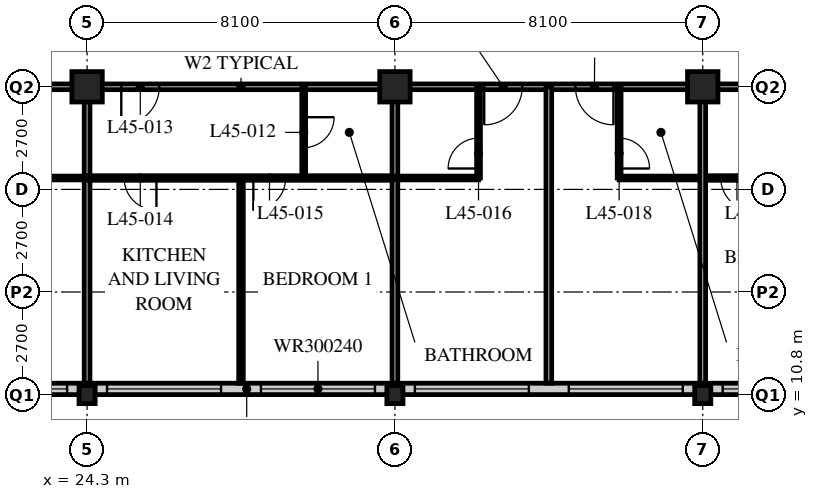
"""IFC4 building model, lengths in metres.
Left out: names, types, materials, properties, quantities, classifications, styles, units other than length and angle.
Written with IfcOpenShell. Run it as: python <this file> out.ifc"""

import sys

from ifc_helpers import new_model, si_unit, direction, frame, frame_2d, origin, origin_2d, place, context, subcontext, project, spatial, rectangle, hollow_rectangle, i_section, extrude, element, fill, save


model = new_model("IFC4")
c1 = context("Model", 3, precision=1e-05, world=origin(), true_north=direction((0.0, 1.0)))
c2 = subcontext(c1, "Body", "Model", "MODEL_VIEW")
j1 = project(units=[si_unit("LENGTHUNIT", "METRE"), si_unit("PLANEANGLEUNIT", "RADIAN")], contexts=[c1])
p1 = place(None, origin())
s1 = spatial("IfcSite", under=j1, at=p1, CompositionType="ELEMENT")
p2 = place(p1, origin())
s2 = spatial("IfcBuilding", under=s1, at=p2, CompositionType="ELEMENT")
p3 = place(p2, frame((0.0, 0.0, 177.6)))
s3 = spatial("IfcBuildingStorey", under=s2, at=p3, CompositionType="ELEMENT", Elevation=177.6)
p4 = place(p3, frame((24.3, 10.8, 0.0), z_axis=(0.0, 0.0, 1.0), x_axis=(1.0, 0.0, 0.0)))
e1 = element("IfcColumn", 1, at=p4, inside=s3, PredefinedType="COLUMN", context=c2, shape_type="SweptSolid", body=[
    extrude(i_section(OverallWidth=0.424, OverallDepth=0.475, WebThickness=0.048, FlangeThickness=0.077, FilletRadius=0.015, at=origin_2d()), origin(), (0.0, 0.0, 1.0), 3.6),
])
p5 = place(p3, frame((24.3, 18.9, 0.0), z_axis=(0.0, 0.0, 1.0), x_axis=(1.0, 0.0, 0.0)))
e2 = element("IfcColumn", 2, at=p5, inside=s3, PredefinedType="COLUMN", context=c2, shape_type="SweptSolid", body=[
    extrude(hollow_rectangle(XDim=0.8, YDim=0.8, WallThickness=0.08, at=origin_2d()), origin(), (0.0, 0.0, 1.0), 3.6),
])
p6 = place(p3, frame((32.4, 10.8, 0.0), z_axis=(0.0, 0.0, 1.0), x_axis=(1.0, 0.0, 0.0)))
e3 = element("IfcColumn", 3, at=p6, inside=s3, PredefinedType="COLUMN", context=c2, shape_type="SweptSolid", body=[
    extrude(i_section(OverallWidth=0.424, OverallDepth=0.475, WebThickness=0.048, FlangeThickness=0.077, FilletRadius=0.015, at=origin_2d()), origin(), (0.0, 0.0, 1.0), 3.6),
])
p7 = place(p3, frame((32.4, 18.9, 0.0), z_axis=(0.0, 0.0, 1.0), x_axis=(1.0, 0.0, 0.0)))
e4 = element("IfcColumn", 4, at=p7, inside=s3, PredefinedType="COLUMN", context=c2, shape_type="SweptSolid", body=[
    extrude(hollow_rectangle(XDim=0.8, YDim=0.8, WallThickness=0.08, at=origin_2d()), origin(), (0.0, 0.0, 1.0), 3.6),
])
p8 = place(p3, frame((40.5, 10.8, 0.0), z_axis=(0.0, 0.0, 1.0), x_axis=(1.0, 0.0, 0.0)))
e5 = element("IfcColumn", 5, at=p8, inside=s3, PredefinedType="COLUMN", context=c2, shape_type="SweptSolid", body=[
    extrude(i_section(OverallWidth=0.424, OverallDepth=0.475, WebThickness=0.048, FlangeThickness=0.077, FilletRadius=0.015, at=origin_2d()), origin(), (0.0, 0.0, 1.0), 3.6),
])
p9 = place(p3, frame((40.5, 18.9, 0.0), z_axis=(0.0, 0.0, 1.0), x_axis=(1.0, 0.0, 0.0)))
e6 = element("IfcColumn", 6, at=p9, inside=s3, PredefinedType="COLUMN", context=c2, shape_type="SweptSolid", body=[
    extrude(hollow_rectangle(XDim=0.8, YDim=0.8, WallThickness=0.08, at=origin_2d()), origin(), (0.0, 0.0, 1.0), 3.6),
])
p10 = place(p3, frame((8.4, 10.95, 0.0), z_axis=(0.0, 0.0, 1.0), x_axis=(1.0, 0.0, 0.0)))
e7 = element("IfcWall", 7, at=p10, inside=s3, PredefinedType="SOLIDWALL", context=c2, shape_type="SweptSolid", body=[
    extrude(rectangle(XDim=40.2, YDim=0.3, at=frame_2d((20.1, 0.0))), origin(), (0.0, 0.0, 1.0), 3.39),
])
p11 = place(p10, frame((0.225, 0.0, 0.6)))
e8 = element("IfcOpeningElement", 8, at=p11, cuts=e7, PredefinedType="OPENING", context=c2, shape_type="SweptSolid", body=[
    extrude(rectangle(XDim=3.0, YDim=2.4, at=frame_2d((1.5, 1.2))), frame((0.0, 0.16, 0.0), z_axis=(0.0, -1.0, 0.0), x_axis=(1.0, 0.0, 0.0)), (0.0, 0.0, 1.0), 0.32),
])
p12 = place(p10, frame((4.275, 0.0, 0.6)))
e9 = element("IfcOpeningElement", 9, at=p12, cuts=e7, PredefinedType="OPENING", context=c2, shape_type="SweptSolid", body=[
    extrude(rectangle(XDim=3.0, YDim=2.4, at=frame_2d((1.5, 1.2))), frame((0.0, 0.16, 0.0), z_axis=(0.0, -1.0, 0.0), x_axis=(1.0, 0.0, 0.0)), (0.0, 0.0, 1.0), 0.32),
])
p13 = place(p10, frame((8.325, 0.0, 0.6)))
e10 = element("IfcOpeningElement", 10, at=p13, cuts=e7, PredefinedType="OPENING", context=c2, shape_type="SweptSolid", body=[
    extrude(rectangle(XDim=3.0, YDim=2.4, at=frame_2d((1.5, 1.2))), frame((0.0, 0.16, 0.0), z_axis=(0.0, -1.0, 0.0), x_axis=(1.0, 0.0, 0.0)), (0.0, 0.0, 1.0), 0.32),
])
p14 = place(p10, frame((12.375, 0.0, 0.6)))
e11 = element("IfcOpeningElement", 11, at=p14, cuts=e7, PredefinedType="OPENING", context=c2, shape_type="SweptSolid", body=[
    extrude(rectangle(XDim=3.0, YDim=2.4, at=frame_2d((1.5, 1.2))), frame((0.0, 0.16, 0.0), z_axis=(0.0, -1.0, 0.0), x_axis=(1.0, 0.0, 0.0)), (0.0, 0.0, 1.0), 0.32),
])
p15 = place(p10, frame((16.425, 0.0, 0.6)))
e12 = element("IfcOpeningElement", 12, at=p15, cuts=e7, PredefinedType="OPENING", context=c2, shape_type="SweptSolid", body=[
    extrude(rectangle(XDim=3.0, YDim=2.4, at=frame_2d((1.5, 1.2))), frame((0.0, 0.16, 0.0), z_axis=(0.0, -1.0, 0.0), x_axis=(1.0, 0.0, 0.0)), (0.0, 0.0, 1.0), 0.32),
])
p16 = place(p10, frame((20.475, 0.0, 0.6)))
e13 = element("IfcOpeningElement", 13, at=p16, cuts=e7, PredefinedType="OPENING", context=c2, shape_type="SweptSolid", body=[
    extrude(rectangle(XDim=3.0, YDim=2.4, at=frame_2d((1.5, 1.2))), frame((0.0, 0.16, 0.0), z_axis=(0.0, -1.0, 0.0), x_axis=(1.0, 0.0, 0.0)), (0.0, 0.0, 1.0), 0.32),
])
p17 = place(p10, frame((24.525, 0.0, 0.6)))
e14 = element("IfcOpeningElement", 14, at=p17, cuts=e7, PredefinedType="OPENING", context=c2, shape_type="SweptSolid", body=[
    extrude(rectangle(XDim=3.0, YDim=2.4, at=frame_2d((1.5, 1.2))), frame((0.0, 0.16, 0.0), z_axis=(0.0, -1.0, 0.0), x_axis=(1.0, 0.0, 0.0)), (0.0, 0.0, 1.0), 0.32),
])
p18 = place(p10, frame((28.575, 0.0, 0.6)))
e15 = element("IfcOpeningElement", 15, at=p18, cuts=e7, PredefinedType="OPENING", context=c2, shape_type="SweptSolid", body=[
    extrude(rectangle(XDim=3.0, YDim=2.4, at=frame_2d((1.5, 1.2))), frame((0.0, 0.16, 0.0), z_axis=(0.0, -1.0, 0.0), x_axis=(1.0, 0.0, 0.0)), (0.0, 0.0, 1.0), 0.32),
])
p19 = place(p10, frame((32.625, 0.0, 0.6)))
e16 = element("IfcOpeningElement", 16, at=p19, cuts=e7, PredefinedType="OPENING", context=c2, shape_type="SweptSolid", body=[
    extrude(rectangle(XDim=3.0, YDim=2.4, at=frame_2d((1.5, 1.2))), frame((0.0, 0.16, 0.0), z_axis=(0.0, -1.0, 0.0), x_axis=(1.0, 0.0, 0.0)), (0.0, 0.0, 1.0), 0.32),
])
p20 = place(p10, frame((36.675, 0.0, 0.6)))
e17 = element("IfcOpeningElement", 17, at=p20, cuts=e7, PredefinedType="OPENING", context=c2, shape_type="SweptSolid", body=[
    extrude(rectangle(XDim=3.0, YDim=2.4, at=frame_2d((1.5, 1.2))), frame((0.0, 0.16, 0.0), z_axis=(0.0, -1.0, 0.0), x_axis=(1.0, 0.0, 0.0)), (0.0, 0.0, 1.0), 0.32),
])
p21 = place(p3, frame((12.15, 18.9, 0.0), z_axis=(0.0, 0.0, 1.0), x_axis=(1.0, 0.0, 0.0)))
e18 = element("IfcWall", 18, at=p21, inside=s3, PredefinedType="PARTITIONING", context=c2, shape_type="SweptSolid", body=[
    extrude(rectangle(XDim=32.4, YDim=0.15, at=frame_2d((16.2, 0.0))), origin(), (0.0, 0.0, 1.0), 2.778),
])
p22 = place(p21, frame((6.4, 0.0, 0.0)))
e19 = element("IfcOpeningElement", 19, at=p22, cuts=e18, PredefinedType="OPENING", context=c2, shape_type="SweptSolid", body=[
    extrude(rectangle(XDim=1.0, YDim=2.1, at=frame_2d((0.5, 1.05))), frame((0.0, 0.085, 0.0), z_axis=(0.0, -1.0, 0.0), x_axis=(1.0, 0.0, 0.0)), (0.0, 0.0, 1.0), 0.17),
])
p23 = place(p21, frame((8.8, 0.0, 0.0)))
e20 = element("IfcOpeningElement", 20, at=p23, cuts=e18, PredefinedType="OPENING", context=c2, shape_type="SweptSolid", body=[
    extrude(rectangle(XDim=1.0, YDim=2.1, at=frame_2d((0.5, 1.05))), frame((0.0, 0.085, 0.0), z_axis=(0.0, -1.0, 0.0), x_axis=(1.0, 0.0, 0.0)), (0.0, 0.0, 1.0), 0.17),
])
p24 = place(p21, frame((13.05, 0.0, 0.0)))
e21 = element("IfcOpeningElement", 21, at=p24, cuts=e18, PredefinedType="OPENING", context=c2, shape_type="SweptSolid", body=[
    extrude(rectangle(XDim=1.0, YDim=2.1, at=frame_2d((0.5, 1.05))), frame((0.0, 0.085, 0.0), z_axis=(0.0, -1.0, 0.0), x_axis=(1.0, 0.0, 0.0)), (0.0, 0.0, 1.0), 0.17),
])
p25 = place(p21, frame((22.6, 0.0, 0.0)))
e22 = element("IfcOpeningElement", 22, at=p25, cuts=e18, PredefinedType="OPENING", context=c2, shape_type="SweptSolid", body=[
    extrude(rectangle(XDim=1.0, YDim=2.1, at=frame_2d((0.5, 1.05))), frame((0.0, 0.085, 0.0), z_axis=(0.0, -1.0, 0.0), x_axis=(1.0, 0.0, 0.0)), (0.0, 0.0, 1.0), 0.17),
])
p26 = place(p21, frame((25.0, 0.0, 0.0)))
e23 = element("IfcOpeningElement", 23, at=p26, cuts=e18, PredefinedType="OPENING", context=c2, shape_type="SweptSolid", body=[
    extrude(rectangle(XDim=1.0, YDim=2.1, at=frame_2d((0.5, 1.05))), frame((0.0, 0.085, 0.0), z_axis=(0.0, -1.0, 0.0), x_axis=(1.0, 0.0, 0.0)), (0.0, 0.0, 1.0), 0.17),
])
p27 = place(p21, frame((1.525, 0.0, 0.0)))
e24 = element("IfcOpeningElement", 24, at=p27, cuts=e18, PredefinedType="OPENING", context=c2, shape_type="SweptSolid", body=[
    extrude(rectangle(XDim=1.0, YDim=2.1, at=frame_2d((0.5, 1.05))), frame((0.0, 0.085, 0.0), z_axis=(0.0, -1.0, 0.0), x_axis=(1.0, 0.0, 0.0)), (0.0, 0.0, 1.0), 0.17),
])
p28 = place(p21, frame((29.875, 0.0, 0.0)))
e25 = element("IfcOpeningElement", 25, at=p28, cuts=e18, PredefinedType="OPENING", context=c2, shape_type="SweptSolid", body=[
    extrude(rectangle(XDim=1.0, YDim=2.1, at=frame_2d((0.5, 1.05))), frame((0.0, 0.085, 0.0), z_axis=(0.0, -1.0, 0.0), x_axis=(1.0, 0.0, 0.0)), (0.0, 0.0, 1.0), 0.17),
])
p29 = place(p3, frame((22.1, 16.5, 0.0), z_axis=(0.0, 0.0, 1.0), x_axis=(1.0, 0.0, 0.0)))
e26 = element("IfcWall", 26, at=p29, inside=s3, PredefinedType="PARTITIONING", context=c2, shape_type="SweptSolid", body=[
    extrude(rectangle(XDim=2.2, YDim=0.1, at=frame_2d((1.1, 0.0))), origin(), (0.0, 0.0, 1.0), 3.39),
])
p30 = place(p3, frame((24.3, 18.9, 0.0), z_axis=(0.0, 0.0, 1.0), x_axis=(0.0, -1.0, 0.0)))
e27 = element("IfcWall", 27, at=p30, inside=s3, PredefinedType="PARTITIONING", context=c2, shape_type="SweptSolid", body=[
    extrude(rectangle(XDim=7.8, YDim=0.15, at=frame_2d((3.9, 0.0))), origin(), (0.0, 0.0, 1.0), 2.778),
])
p31 = place(p3, frame((24.3, 16.5, 0.0), z_axis=(0.0, 0.0, 1.0), x_axis=(1.0, 0.0, 0.0)))
e28 = element("IfcWall", 28, at=p31, inside=s3, PredefinedType="PARTITIONING", context=c2, shape_type="SweptSolid", body=[
    extrude(rectangle(XDim=8.1, YDim=0.12, at=frame_2d((4.05, 0.0))), origin(), (0.0, 0.0, 1.0), 3.39),
])
p32 = place(p31, frame((0.975, 0.0, 0.0)))
e29 = element("IfcOpeningElement", 29, at=p32, cuts=e28, PredefinedType="OPENING", context=c2, shape_type="SweptSolid", body=[
    extrude(rectangle(XDim=0.85, YDim=2.1, at=frame_2d((0.425, 1.05))), frame((0.0, 0.07, 0.0), z_axis=(0.0, -1.0, 0.0), x_axis=(1.0, 0.0, 0.0)), (0.0, 0.0, 1.0), 0.14),
])
p33 = place(p31, frame((4.375, 0.0, 0.0)))
e30 = element("IfcOpeningElement", 30, at=p33, cuts=e28, PredefinedType="OPENING", context=c2, shape_type="SweptSolid", body=[
    extrude(rectangle(XDim=0.85, YDim=2.1, at=frame_2d((0.425, 1.05))), frame((0.0, 0.07, 0.0), z_axis=(0.0, -1.0, 0.0), x_axis=(1.0, 0.0, 0.0)), (0.0, 0.0, 1.0), 0.14),
])
p34 = place(p3, frame((30.0, 18.9, 0.0), z_axis=(0.0, 0.0, 1.0), x_axis=(0.0, -1.0, 0.0)))
e31 = element("IfcWall", 31, at=p34, inside=s3, PredefinedType="PARTITIONING", context=c2, shape_type="SweptSolid", body=[
    extrude(rectangle(XDim=2.4, YDim=0.1, at=frame_2d((1.2, 0.0))), origin(), (0.0, 0.0, 1.0), 3.39),
])
p35 = place(p34, frame((0.8, 0.0, 0.0)))
e32 = element("IfcOpeningElement", 32, at=p35, cuts=e31, PredefinedType="OPENING", context=c2, shape_type="SweptSolid", body=[
    extrude(rectangle(XDim=0.8, YDim=2.1, at=frame_2d((0.4, 1.05))), frame((0.0, 0.06, 0.0), z_axis=(0.0, -1.0, 0.0), x_axis=(1.0, 0.0, 0.0)), (0.0, 0.0, 1.0), 0.12),
])
p36 = place(p3, frame((28.35, 16.5, 0.0), z_axis=(0.0, 0.0, 1.0), x_axis=(0.0, -1.0, 0.0)))
e33 = element("IfcWall", 33, at=p36, inside=s3, PredefinedType="PARTITIONING", context=c2, shape_type="SweptSolid", body=[
    extrude(rectangle(XDim=5.4, YDim=0.12, at=frame_2d((2.7, 0.0))), origin(), (0.0, 0.0, 1.0), 3.39),
])
p37 = place(p3, frame((32.4, 18.9, 0.0), z_axis=(0.0, 0.0, 1.0), x_axis=(0.0, -1.0, 0.0)))
e34 = element("IfcWall", 34, at=p37, inside=s3, PredefinedType="PARTITIONING", context=c2, shape_type="SweptSolid", body=[
    extrude(rectangle(XDim=7.8, YDim=0.15, at=frame_2d((3.9, 0.0))), origin(), (0.0, 0.0, 1.0), 2.778),
])
p38 = place(p3, frame((32.4, 16.5, 0.0), z_axis=(0.0, 0.0, 1.0), x_axis=(1.0, 0.0, 0.0)))
e35 = element("IfcWall", 35, at=p38, inside=s3, PredefinedType="PARTITIONING", context=c2, shape_type="SweptSolid", body=[
    extrude(rectangle(XDim=2.2, YDim=0.1, at=frame_2d((1.1, 0.0))), origin(), (0.0, 0.0, 1.0), 3.39),
])
p39 = place(p3, frame((34.6, 18.9, 0.0), z_axis=(0.0, 0.0, 1.0), x_axis=(0.0, -1.0, 0.0)))
e36 = element("IfcWall", 36, at=p39, inside=s3, PredefinedType="PARTITIONING", context=c2, shape_type="SweptSolid", body=[
    extrude(rectangle(XDim=2.4, YDim=0.1, at=frame_2d((1.2, 0.0))), origin(), (0.0, 0.0, 1.0), 3.39),
])
p40 = place(p39, frame((1.35, 0.0, 0.0)))
e37 = element("IfcOpeningElement", 37, at=p40, cuts=e36, PredefinedType="OPENING", context=c2, shape_type="SweptSolid", body=[
    extrude(rectangle(XDim=0.8, YDim=2.1, at=frame_2d((0.4, 1.05))), frame((0.0, 0.06, 0.0), z_axis=(0.0, -1.0, 0.0), x_axis=(1.0, 0.0, 0.0)), (0.0, 0.0, 1.0), 0.12),
])
p41 = place(p3, frame((36.45, 18.9, 0.0), z_axis=(0.0, 0.0, 1.0), x_axis=(0.0, -1.0, 0.0)))
e38 = element("IfcWall", 38, at=p41, inside=s3, PredefinedType="PARTITIONING", context=c2, shape_type="SweptSolid", body=[
    extrude(rectangle(XDim=7.8, YDim=0.15, at=frame_2d((3.9, 0.0))), origin(), (0.0, 0.0, 1.0), 3.39),
])
p42 = place(p3, frame((38.3, 16.5, 0.0), z_axis=(0.0, 0.0, 1.0), x_axis=(1.0, 0.0, 0.0)))
e39 = element("IfcWall", 39, at=p42, inside=s3, PredefinedType="PARTITIONING", context=c2, shape_type="SweptSolid", body=[
    extrude(rectangle(XDim=2.2, YDim=0.1, at=frame_2d((1.1, 0.0))), origin(), (0.0, 0.0, 1.0), 3.39),
])
p43 = place(p3, frame((38.3, 18.9, 0.0), z_axis=(0.0, 0.0, 1.0), x_axis=(0.0, -1.0, 0.0)))
e40 = element("IfcWall", 40, at=p43, inside=s3, PredefinedType="PARTITIONING", context=c2, shape_type="SweptSolid", body=[
    extrude(rectangle(XDim=2.4, YDim=0.1, at=frame_2d((1.2, 0.0))), origin(), (0.0, 0.0, 1.0), 3.39),
])
p44 = place(p43, frame((1.35, 0.0, 0.0)))
e41 = element("IfcOpeningElement", 41, at=p44, cuts=e40, PredefinedType="OPENING", context=c2, shape_type="SweptSolid", body=[
    extrude(rectangle(XDim=0.8, YDim=2.1, at=frame_2d((0.4, 1.05))), frame((0.0, 0.06, 0.0), z_axis=(0.0, -1.0, 0.0), x_axis=(1.0, 0.0, 0.0)), (0.0, 0.0, 1.0), 0.12),
])
p45 = place(p3, frame((40.5, 16.5, 0.0), z_axis=(0.0, 0.0, 1.0), x_axis=(1.0, 0.0, 0.0)))
e42 = element("IfcWall", 42, at=p45, inside=s3, PredefinedType="PARTITIONING", context=c2, shape_type="SweptSolid", body=[
    extrude(rectangle(XDim=8.05, YDim=0.12, at=frame_2d((4.025, 0.0))), origin(), (0.0, 0.0, 1.0), 3.39),
])
p46 = place(p45, frame((0.475, 0.0, 0.0)))
e43 = element("IfcOpeningElement", 43, at=p46, cuts=e42, PredefinedType="OPENING", context=c2, shape_type="SweptSolid", body=[
    extrude(rectangle(XDim=0.85, YDim=2.1, at=frame_2d((0.425, 1.05))), frame((0.0, 0.07, 0.0), z_axis=(0.0, -1.0, 0.0), x_axis=(1.0, 0.0, 0.0)), (0.0, 0.0, 1.0), 0.14),
])
p47 = place(p45, frame((4.325, 0.0, 0.0)))
e44 = element("IfcOpeningElement", 44, at=p47, cuts=e42, PredefinedType="OPENING", context=c2, shape_type="SweptSolid", body=[
    extrude(rectangle(XDim=0.85, YDim=2.1, at=frame_2d((0.425, 1.05))), frame((0.0, 0.07, 0.0), z_axis=(0.0, -1.0, 0.0), x_axis=(1.0, 0.0, 0.0)), (0.0, 0.0, 1.0), 0.14),
])
p48 = place(p3, frame((40.5, 18.9, 0.0), z_axis=(0.0, 0.0, 1.0), x_axis=(0.0, -1.0, 0.0)))
e45 = element("IfcWall", 45, at=p48, inside=s3, PredefinedType="PARTITIONING", context=c2, shape_type="SweptSolid", body=[
    extrude(rectangle(XDim=7.8, YDim=0.15, at=frame_2d((3.9, 0.0))), origin(), (0.0, 0.0, 1.0), 2.778),
])
p49 = place(p14, origin())
e46 = element("IfcWindow", 46, at=p49, inside=s3, PartitioningType="SINGLE_PANEL", PredefinedType="WINDOW", context=c2, shape_type="SweptSolid", body=[
    extrude(rectangle(XDim=3.0, YDim=2.4, at=frame_2d((1.5, 1.2))), frame((0.0, 0.03, 0.0), z_axis=(0.0, -1.0, 0.0), x_axis=(1.0, 0.0, 0.0)), (0.0, 0.0, 1.0), 0.06),
])
fill(e11, e46)
p50 = place(p15, origin())
e47 = element("IfcWindow", 47, at=p50, inside=s3, PartitioningType="SINGLE_PANEL", PredefinedType="WINDOW", context=c2, shape_type="SweptSolid", body=[
    extrude(rectangle(XDim=3.0, YDim=2.4, at=frame_2d((1.5, 1.2))), frame((0.0, 0.03, 0.0), z_axis=(0.0, -1.0, 0.0), x_axis=(1.0, 0.0, 0.0)), (0.0, 0.0, 1.0), 0.06),
])
fill(e12, e47)
p51 = place(p16, origin())
e48 = element("IfcWindow", 48, at=p51, inside=s3, PartitioningType="SINGLE_PANEL", PredefinedType="WINDOW", context=c2, shape_type="SweptSolid", body=[
    extrude(rectangle(XDim=3.0, YDim=2.4, at=frame_2d((1.5, 1.2))), frame((0.0, 0.03, 0.0), z_axis=(0.0, -1.0, 0.0), x_axis=(1.0, 0.0, 0.0)), (0.0, 0.0, 1.0), 0.06),
])
fill(e13, e48)
p52 = place(p17, origin())
e49 = element("IfcWindow", 49, at=p52, inside=s3, PartitioningType="SINGLE_PANEL", PredefinedType="WINDOW", context=c2, shape_type="SweptSolid", body=[
    extrude(rectangle(XDim=3.0, YDim=2.4, at=frame_2d((1.5, 1.2))), frame((0.0, 0.03, 0.0), z_axis=(0.0, -1.0, 0.0), x_axis=(1.0, 0.0, 0.0)), (0.0, 0.0, 1.0), 0.06),
])
fill(e14, e49)
p53 = place(p18, origin())
e50 = element("IfcWindow", 50, at=p53, inside=s3, PartitioningType="SINGLE_PANEL", PredefinedType="WINDOW", context=c2, shape_type="SweptSolid", body=[
    extrude(rectangle(XDim=3.0, YDim=2.4, at=frame_2d((1.5, 1.2))), frame((0.0, 0.03, 0.0), z_axis=(0.0, -1.0, 0.0), x_axis=(1.0, 0.0, 0.0)), (0.0, 0.0, 1.0), 0.06),
])
fill(e15, e50)
p54 = place(p19, origin())
e51 = element("IfcWindow", 51, at=p54, inside=s3, PartitioningType="SINGLE_PANEL", PredefinedType="WINDOW", context=c2, shape_type="SweptSolid", body=[
    extrude(rectangle(XDim=3.0, YDim=2.4, at=frame_2d((1.5, 1.2))), frame((0.0, 0.03, 0.0), z_axis=(0.0, -1.0, 0.0), x_axis=(1.0, 0.0, 0.0)), (0.0, 0.0, 1.0), 0.06),
])
fill(e16, e51)
p55 = place(p35, origin())
e52 = element("IfcDoor", 52, at=p55, inside=s3, OperationType="SINGLE_SWING_LEFT", PredefinedType="DOOR", context=c2, shape_type="SweptSolid", body=[
    extrude(rectangle(XDim=0.8, YDim=2.1, at=frame_2d((0.4, 1.05))), frame((0.0, 0.025, 0.0), z_axis=(0.0, -1.0, 0.0), x_axis=(1.0, 0.0, 0.0)), (0.0, 0.0, 1.0), 0.05),
])
fill(e32, e52)
p56 = place(p24, origin())
e53 = element("IfcDoor", 53, at=p56, inside=s3, OperationType="SINGLE_SWING_RIGHT", PredefinedType="DOOR", context=c2, shape_type="SweptSolid", body=[
    extrude(rectangle(XDim=1.0, YDim=2.1, at=frame_2d((0.5, 1.05))), frame((0.0, 0.025, 0.0), z_axis=(0.0, -1.0, 0.0), x_axis=(1.0, 0.0, 0.0)), (0.0, 0.0, 1.0), 0.05),
])
fill(e21, e53)
p57 = place(p32, origin())
e54 = element("IfcDoor", 54, at=p57, inside=s3, OperationType="SINGLE_SWING_LEFT", PredefinedType="DOOR", context=c2, shape_type="SweptSolid", body=[
    extrude(rectangle(XDim=0.85, YDim=2.1, at=frame_2d((0.425, 1.05))), frame((0.0, 0.025, 0.0), z_axis=(0.0, -1.0, 0.0), x_axis=(1.0, 0.0, 0.0)), (0.0, 0.0, 1.0), 0.05),
])
fill(e29, e54)
p58 = place(p33, origin())
e55 = element("IfcDoor", 55, at=p58, inside=s3, OperationType="SINGLE_SWING_RIGHT", PredefinedType="DOOR", context=c2, shape_type="SweptSolid", body=[
    extrude(rectangle(XDim=0.85, YDim=2.1, at=frame_2d((0.425, 1.05))), frame((0.0, 0.025, 0.0), z_axis=(0.0, -1.0, 0.0), x_axis=(1.0, 0.0, 0.0)), (0.0, 0.0, 1.0), 0.05),
])
fill(e30, e55)
p59 = place(p40, origin())
e56 = element("IfcDoor", 56, at=p59, inside=s3, OperationType="SINGLE_SWING_LEFT", PredefinedType="DOOR", context=c2, shape_type="SweptSolid", body=[
    extrude(rectangle(XDim=0.8, YDim=2.1, at=frame_2d((0.4, 1.05))), frame((0.0, 0.025, 0.0), z_axis=(0.0, -1.0, 0.0), x_axis=(1.0, 0.0, 0.0)), (0.0, 0.0, 1.0), 0.05),
])
fill(e37, e56)
p60 = place(p25, origin())
e57 = element("IfcDoor", 57, at=p60, inside=s3, OperationType="SINGLE_SWING_RIGHT", PredefinedType="DOOR", context=c2, shape_type="SweptSolid", body=[
    extrude(rectangle(XDim=1.0, YDim=2.1, at=frame_2d((0.5, 1.05))), frame((0.0, 0.025, 0.0), z_axis=(0.0, -1.0, 0.0), x_axis=(1.0, 0.0, 0.0)), (0.0, 0.0, 1.0), 0.05),
])
fill(e22, e57)
p61 = place(p44, origin())
e58 = element("IfcDoor", 58, at=p61, inside=s3, OperationType="SINGLE_SWING_RIGHT", PredefinedType="DOOR", context=c2, shape_type="SweptSolid", body=[
    extrude(rectangle(XDim=0.8, YDim=2.1, at=frame_2d((0.4, 1.05))), frame((0.0, 0.025, 0.0), z_axis=(0.0, -1.0, 0.0), x_axis=(1.0, 0.0, 0.0)), (0.0, 0.0, 1.0), 0.05),
])
fill(e41, e58)
p62 = place(p26, origin())
e59 = element("IfcDoor", 59, at=p62, inside=s3, OperationType="SINGLE_SWING_LEFT", PredefinedType="DOOR", context=c2, shape_type="SweptSolid", body=[
    extrude(rectangle(XDim=1.0, YDim=2.1, at=frame_2d((0.5, 1.05))), frame((0.0, 0.025, 0.0), z_axis=(0.0, -1.0, 0.0), x_axis=(1.0, 0.0, 0.0)), (0.0, 0.0, 1.0), 0.05),
])
fill(e23, e59)
p63 = place(p46, origin())
e60 = element("IfcDoor", 60, at=p63, inside=s3, OperationType="SINGLE_SWING_LEFT", PredefinedType="DOOR", context=c2, shape_type="SweptSolid", body=[
    extrude(rectangle(XDim=0.85, YDim=2.1, at=frame_2d((0.425, 1.05))), frame((0.0, 0.025, 0.0), z_axis=(0.0, -1.0, 0.0), x_axis=(1.0, 0.0, 0.0)), (0.0, 0.0, 1.0), 0.05),
])
fill(e43, e60)
save(model, sys.argv[1])
